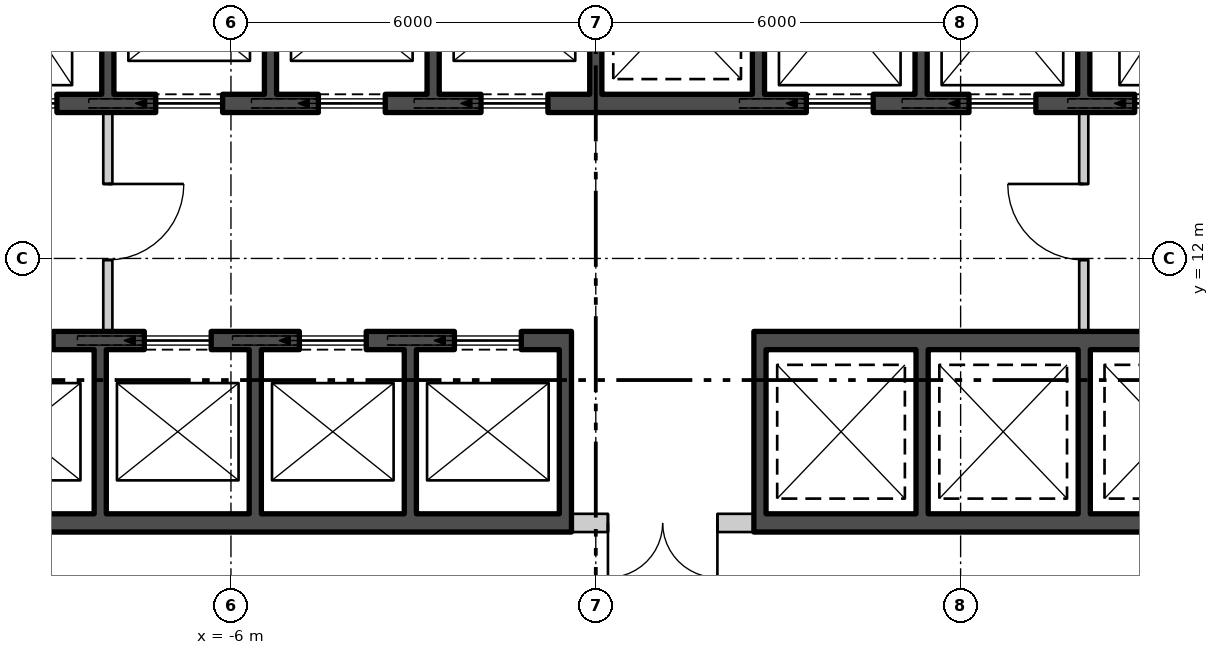
"""IFC4 building model, lengths in metres.
Left out: names, types, materials, properties, quantities, classifications, styles, units other than length and angle.
Written with IfcOpenShell. Run it as: python <this file> out.ifc"""

import sys

from ifc_helpers import new_model, si_unit, direction, frame, frame_2d, origin, place, context, subcontext, project, spatial, rectangle, extrude, element, fill, save


model = new_model("IFC4")
c1 = context("Model", 3, precision=1e-05, world=origin(), true_north=direction((0.0, 1.0)))
c2 = subcontext(c1, "Body", "Model", "MODEL_VIEW")
j1 = project(units=[si_unit("LENGTHUNIT", "METRE"), si_unit("PLANEANGLEUNIT", "RADIAN")], contexts=[c1])
p1 = place(None, origin())
s1 = spatial("IfcSite", under=j1, at=p1, CompositionType="ELEMENT")
p2 = place(p1, origin())
s2 = spatial("IfcBuilding", under=s1, at=p2, CompositionType="ELEMENT")
p3 = place(p2, frame((0.0, 0.0, 8.4)))
s3 = spatial("IfcBuildingStorey", under=s2, at=p3, CompositionType="ELEMENT", Elevation=8.4)
p4 = place(p3, frame((-10.7, 14.55, 0.0), z_axis=(0.0, 0.0, 1.0), x_axis=(1.0, 0.0, 0.0)))
e1 = element("IfcWall", 1, at=p4, inside=s3, PredefinedType="SHEAR", context=c2, shape_type="SweptSolid", body=[
    extrude(rectangle(XDim=21.4, YDim=0.3, at=frame_2d((10.7, 0.0))), origin(), (0.0, 0.0, 1.0), 4.88),
])
p5 = place(p4, frame((0.738, 0.0, 0.0)))
e2 = element("IfcOpeningElement", 2, at=p5, cuts=e1, PredefinedType="OPENING", context=c2, shape_type="SweptSolid", body=[
    extrude(rectangle(XDim=1.1, YDim=2.1, at=frame_2d((0.55, 1.05))), frame((0.0, 0.16, 0.0), z_axis=(0.0, -1.0, 0.0), x_axis=(1.0, 0.0, 0.0)), (0.0, 0.0, 1.0), 0.32),
])
p6 = place(p4, frame((3.462, 0.0, 0.0)))
e3 = element("IfcOpeningElement", 3, at=p6, cuts=e1, PredefinedType="OPENING", context=c2, shape_type="SweptSolid", body=[
    extrude(rectangle(XDim=1.1, YDim=2.1, at=frame_2d((0.55, 1.05))), frame((0.0, 0.16, 0.0), z_axis=(0.0, -1.0, 0.0), x_axis=(1.0, 0.0, 0.0)), (0.0, 0.0, 1.0), 0.32),
])
p7 = place(p4, frame((6.138, 0.0, 0.0)))
e4 = element("IfcOpeningElement", 4, at=p7, cuts=e1, PredefinedType="OPENING", context=c2, shape_type="SweptSolid", body=[
    extrude(rectangle(XDim=1.1, YDim=2.1, at=frame_2d((0.55, 1.05))), frame((0.0, 0.16, 0.0), z_axis=(0.0, -1.0, 0.0), x_axis=(1.0, 0.0, 0.0)), (0.0, 0.0, 1.0), 0.32),
])
p8 = place(p4, frame((8.812, 0.0, 0.0)))
e5 = element("IfcOpeningElement", 5, at=p8, cuts=e1, PredefinedType="OPENING", context=c2, shape_type="SweptSolid", body=[
    extrude(rectangle(XDim=1.1, YDim=2.1, at=frame_2d((0.55, 1.05))), frame((0.0, 0.16, 0.0), z_axis=(0.0, -1.0, 0.0), x_axis=(1.0, 0.0, 0.0)), (0.0, 0.0, 1.0), 0.32),
])
p9 = place(p4, frame((14.162, 0.0, 0.0)))
e6 = element("IfcOpeningElement", 6, at=p9, cuts=e1, PredefinedType="OPENING", context=c2, shape_type="SweptSolid", body=[
    extrude(rectangle(XDim=1.1, YDim=2.1, at=frame_2d((0.55, 1.05))), frame((0.0, 0.16, 0.0), z_axis=(0.0, -1.0, 0.0), x_axis=(1.0, 0.0, 0.0)), (0.0, 0.0, 1.0), 0.32),
])
p10 = place(p4, frame((16.837, 0.0, 0.0)))
e7 = element("IfcOpeningElement", 7, at=p10, cuts=e1, PredefinedType="OPENING", context=c2, shape_type="SweptSolid", body=[
    extrude(rectangle(XDim=1.1, YDim=2.1, at=frame_2d((0.55, 1.05))), frame((0.0, 0.16, 0.0), z_axis=(0.0, -1.0, 0.0), x_axis=(1.0, 0.0, 0.0)), (0.0, 0.0, 1.0), 0.32),
])
p11 = place(p4, frame((19.562, 0.0, 0.0)))
e8 = element("IfcOpeningElement", 8, at=p11, cuts=e1, PredefinedType="OPENING", context=c2, shape_type="SweptSolid", body=[
    extrude(rectangle(XDim=1.1, YDim=2.1, at=frame_2d((0.55, 1.05))), frame((0.0, 0.16, 0.0), z_axis=(0.0, -1.0, 0.0), x_axis=(1.0, 0.0, 0.0)), (0.0, 0.0, 1.0), 0.32),
])
p12 = place(p3, frame((-10.7, 10.65, 0.0), z_axis=(0.0, 0.0, 1.0), x_axis=(1.0, 0.0, 0.0)))
e9 = element("IfcWall", 9, at=p12, inside=s3, PredefinedType="SHEAR", context=c2, shape_type="SweptSolid", body=[
    extrude(rectangle(XDim=10.3, YDim=0.3, at=frame_2d((5.15, 0.0))), origin(), (0.0, 0.0, 1.0), 4.88),
])
p13 = place(p12, frame((0.675, 0.0, 0.0)))
e10 = element("IfcOpeningElement", 10, at=p13, cuts=e9, PredefinedType="OPENING", context=c2, shape_type="SweptSolid", body=[
    extrude(rectangle(XDim=1.1, YDim=2.1, at=frame_2d((0.55, 1.05))), frame((0.0, 0.16, 0.0), z_axis=(0.0, -1.0, 0.0), x_axis=(1.0, 0.0, 0.0)), (0.0, 0.0, 1.0), 0.32),
])
p14 = place(p12, frame((3.275, 0.0, 0.0)))
e11 = element("IfcOpeningElement", 11, at=p14, cuts=e9, PredefinedType="OPENING", context=c2, shape_type="SweptSolid", body=[
    extrude(rectangle(XDim=1.1, YDim=2.1, at=frame_2d((0.55, 1.05))), frame((0.0, 0.16, 0.0), z_axis=(0.0, -1.0, 0.0), x_axis=(1.0, 0.0, 0.0)), (0.0, 0.0, 1.0), 0.32),
])
p15 = place(p12, frame((5.825, 0.0, 0.0)))
e12 = element("IfcOpeningElement", 12, at=p15, cuts=e9, PredefinedType="OPENING", context=c2, shape_type="SweptSolid", body=[
    extrude(rectangle(XDim=1.1, YDim=2.1, at=frame_2d((0.55, 1.05))), frame((0.0, 0.16, 0.0), z_axis=(0.0, -1.0, 0.0), x_axis=(1.0, 0.0, 0.0)), (0.0, 0.0, 1.0), 0.32),
])
p16 = place(p12, frame((8.375, 0.0, 0.0)))
e13 = element("IfcOpeningElement", 13, at=p16, cuts=e9, PredefinedType="OPENING", context=c2, shape_type="SweptSolid", body=[
    extrude(rectangle(XDim=1.1, YDim=2.1, at=frame_2d((0.55, 1.05))), frame((0.0, 0.16, 0.0), z_axis=(0.0, -1.0, 0.0), x_axis=(1.0, 0.0, 0.0)), (0.0, 0.0, 1.0), 0.32),
])
p17 = place(p3, frame((-10.7, 7.65, 0.0), z_axis=(0.0, 0.0, 1.0), x_axis=(1.0, 0.0, 0.0)))
e14 = element("IfcWall", 14, at=p17, inside=s3, PredefinedType="SHEAR", context=c2, shape_type="SweptSolid", body=[
    extrude(rectangle(XDim=10.3, YDim=0.3, at=frame_2d((5.15, 0.0))), origin(), (0.0, 0.0, 1.0), 4.88),
])
for number, where, z_axis, x_axis in (
    (15, (2.6, 10.65, 0.0), (0.0, 0.0, 1.0), (1.0, 0.0, 0.0)),
    (16, (2.6, 7.65, 0.0), (0.0, 0.0, 1.0), (1.0, 0.0, 0.0)),
):
    element("IfcWall", number, at=place(p3, frame(where, z_axis=z_axis, x_axis=x_axis)), inside=s3, PredefinedType="SHEAR", context=c2, shape_type="SweptSolid", body=[
        extrude(rectangle(XDim=8.1, YDim=0.3, at=frame_2d((4.05, 0.0))), origin(), (0.0, 0.0, 1.0), 4.88),
    ])
for number, where, z_axis, x_axis in (
    (17, (-8.025, 14.7, 0.0), (0.0, 0.0, 1.0), (0.0, 1.0, 0.0)),
    (18, (-5.35, 14.7, 0.0), (0.0, 0.0, 1.0), (0.0, 1.0, 0.0)),
    (19, (-2.675, 14.7, 0.0), (0.0, 0.0, 1.0), (0.0, 1.0, 0.0)),
    (20, (0.0, 14.7, 0.0), (0.0, 0.0, 1.0), (0.0, 1.0, 0.0)),
    (21, (2.675, 14.7, 0.0), (0.0, 0.0, 1.0), (0.0, 1.0, 0.0)),
    (22, (5.35, 14.7, 0.0), (0.0, 0.0, 1.0), (0.0, 1.0, 0.0)),
    (23, (8.025, 14.7, 0.0), (0.0, 0.0, 1.0), (0.0, 1.0, 0.0)),
    (24, (-8.15, 7.8, 0.0), (0.0, 0.0, 1.0), (0.0, 1.0, 0.0)),
    (25, (-5.6, 7.8, 0.0), (0.0, 0.0, 1.0), (0.0, 1.0, 0.0)),
    (26, (-3.05, 7.8, 0.0), (0.0, 0.0, 1.0), (0.0, 1.0, 0.0)),
    (27, (-0.5, 7.8, 0.0), (0.0, 0.0, 1.0), (0.0, 1.0, 0.0)),
    (28, (2.7, 7.8, 0.0), (0.0, 0.0, 1.0), (0.0, 1.0, 0.0)),
    (29, (5.367, 7.8, 0.0), (0.0, 0.0, 1.0), (0.0, 1.0, 0.0)),
    (30, (8.033, 7.8, 0.0), (0.0, 0.0, 1.0), (0.0, 1.0, 0.0)),
):
    element("IfcWall", number, at=place(p3, frame(where, z_axis=z_axis, x_axis=x_axis)), inside=s3, PredefinedType="SHEAR", context=c2, shape_type="SweptSolid", body=[
        extrude(rectangle(XDim=2.7, YDim=0.2, at=frame_2d((1.35, 0.0))), origin(), (0.0, 0.0, 1.0), 4.88),
    ])
p18 = place(p3, frame((-8.025, 10.8, 0.0), z_axis=(0.0, 0.0, 1.0), x_axis=(0.0, 1.0, 0.0)))
e31 = element("IfcWall", 31, at=p18, inside=s3, PredefinedType="PARTITIONING", context=c2, shape_type="SweptSolid", body=[
    extrude(rectangle(XDim=3.6, YDim=0.15, at=frame_2d((1.8, 0.0))), origin(), (0.0, 0.0, 1.0), 4.88),
])
p19 = place(p18, frame((1.175, 0.0, 0.0)))
e32 = element("IfcOpeningElement", 32, at=p19, cuts=e31, PredefinedType="OPENING", context=c2, shape_type="SweptSolid", body=[
    extrude(rectangle(XDim=1.25, YDim=2.1, at=frame_2d((0.625, 1.05))), frame((0.0, 0.085, 0.0), z_axis=(0.0, -1.0, 0.0), x_axis=(1.0, 0.0, 0.0)), (0.0, 0.0, 1.0), 0.17),
])
p20 = place(p3, frame((8.025, 10.8, 0.0), z_axis=(0.0, 0.0, 1.0), x_axis=(0.0, 1.0, 0.0)))
e33 = element("IfcWall", 33, at=p20, inside=s3, PredefinedType="PARTITIONING", context=c2, shape_type="SweptSolid", body=[
    extrude(rectangle(XDim=3.6, YDim=0.15, at=frame_2d((1.8, 0.0))), origin(), (0.0, 0.0, 1.0), 4.88),
])
p21 = place(p20, frame((1.175, 0.0, 0.0)))
e34 = element("IfcOpeningElement", 34, at=p21, cuts=e33, PredefinedType="OPENING", context=c2, shape_type="SweptSolid", body=[
    extrude(rectangle(XDim=1.25, YDim=2.1, at=frame_2d((0.625, 1.05))), frame((0.0, 0.085, 0.0), z_axis=(0.0, -1.0, 0.0), x_axis=(1.0, 0.0, 0.0)), (0.0, 0.0, 1.0), 0.17),
])
p22 = place(p3, frame((-0.4, 7.65, 0.0), z_axis=(0.0, 0.0, 1.0), x_axis=(1.0, 0.0, 0.0)))
e35 = element("IfcWall", 35, at=p22, inside=s3, PredefinedType="PARTITIONING", context=c2, shape_type="SweptSolid", body=[
    extrude(rectangle(XDim=3.0, YDim=0.3, at=frame_2d((1.5, 0.0))), origin(), (0.0, 0.0, 1.0), 4.88),
])
p23 = place(p22, frame((0.6, 0.0, 0.0)))
e36 = element("IfcOpeningElement", 36, at=p23, cuts=e35, PredefinedType="OPENING", context=c2, shape_type="SweptSolid", body=[
    extrude(rectangle(XDim=1.8, YDim=2.4, at=frame_2d((0.9, 1.2))), frame((0.0, 0.16, 0.0), z_axis=(0.0, -1.0, 0.0), x_axis=(1.0, 0.0, 0.0)), (0.0, 0.0, 1.0), 0.32),
])
p24 = place(p5, origin())
e37 = element("IfcDoor", 37, at=p24, inside=s3, OperationType="SLIDING_TO_LEFT", PredefinedType="DOOR", context=c2, shape_type="SweptSolid", body=[
    extrude(rectangle(XDim=1.1, YDim=2.1, at=frame_2d((0.55, 1.05))), frame((0.0, 0.025, 0.0), z_axis=(0.0, -1.0, 0.0), x_axis=(1.0, 0.0, 0.0)), (0.0, 0.0, 1.0), 0.05),
])
fill(e2, e37)
p25 = place(p6, origin())
e38 = element("IfcDoor", 38, at=p25, inside=s3, OperationType="SLIDING_TO_LEFT", PredefinedType="DOOR", context=c2, shape_type="SweptSolid", body=[
    extrude(rectangle(XDim=1.1, YDim=2.1, at=frame_2d((0.55, 1.05))), frame((0.0, 0.025, 0.0), z_axis=(0.0, -1.0, 0.0), x_axis=(1.0, 0.0, 0.0)), (0.0, 0.0, 1.0), 0.05),
])
fill(e3, e38)
p26 = place(p7, origin())
e39 = element("IfcDoor", 39, at=p26, inside=s3, OperationType="SLIDING_TO_LEFT", PredefinedType="DOOR", context=c2, shape_type="SweptSolid", body=[
    extrude(rectangle(XDim=1.1, YDim=2.1, at=frame_2d((0.55, 1.05))), frame((0.0, 0.025, 0.0), z_axis=(0.0, -1.0, 0.0), x_axis=(1.0, 0.0, 0.0)), (0.0, 0.0, 1.0), 0.05),
])
fill(e4, e39)
p27 = place(p8, origin())
e40 = element("IfcDoor", 40, at=p27, inside=s3, OperationType="SLIDING_TO_LEFT", PredefinedType="DOOR", context=c2, shape_type="SweptSolid", body=[
    extrude(rectangle(XDim=1.1, YDim=2.1, at=frame_2d((0.55, 1.05))), frame((0.0, 0.025, 0.0), z_axis=(0.0, -1.0, 0.0), x_axis=(1.0, 0.0, 0.0)), (0.0, 0.0, 1.0), 0.05),
])
fill(e5, e40)
p28 = place(p9, origin())
e41 = element("IfcDoor", 41, at=p28, inside=s3, OperationType="SLIDING_TO_LEFT", PredefinedType="DOOR", context=c2, shape_type="SweptSolid", body=[
    extrude(rectangle(XDim=1.1, YDim=2.1, at=frame_2d((0.55, 1.05))), frame((0.0, 0.025, 0.0), z_axis=(0.0, -1.0, 0.0), x_axis=(1.0, 0.0, 0.0)), (0.0, 0.0, 1.0), 0.05),
])
fill(e6, e41)
p29 = place(p10, origin())
e42 = element("IfcDoor", 42, at=p29, inside=s3, OperationType="SLIDING_TO_LEFT", PredefinedType="DOOR", context=c2, shape_type="SweptSolid", body=[
    extrude(rectangle(XDim=1.1, YDim=2.1, at=frame_2d((0.55, 1.05))), frame((0.0, 0.025, 0.0), z_axis=(0.0, -1.0, 0.0), x_axis=(1.0, 0.0, 0.0)), (0.0, 0.0, 1.0), 0.05),
])
fill(e7, e42)
p30 = place(p11, origin())
e43 = element("IfcDoor", 43, at=p30, inside=s3, OperationType="SLIDING_TO_LEFT", PredefinedType="DOOR", context=c2, shape_type="SweptSolid", body=[
    extrude(rectangle(XDim=1.1, YDim=2.1, at=frame_2d((0.55, 1.05))), frame((0.0, 0.025, 0.0), z_axis=(0.0, -1.0, 0.0), x_axis=(1.0, 0.0, 0.0)), (0.0, 0.0, 1.0), 0.05),
])
fill(e8, e43)
p31 = place(p13, origin())
e44 = element("IfcDoor", 44, at=p31, inside=s3, OperationType="SLIDING_TO_LEFT", PredefinedType="DOOR", context=c2, shape_type="SweptSolid", body=[
    extrude(rectangle(XDim=1.1, YDim=2.1, at=frame_2d((0.55, 1.05))), frame((0.0, 0.025, 0.0), z_axis=(0.0, -1.0, 0.0), x_axis=(1.0, 0.0, 0.0)), (0.0, 0.0, 1.0), 0.05),
])
fill(e10, e44)
p32 = place(p14, origin())
e45 = element("IfcDoor", 45, at=p32, inside=s3, OperationType="SLIDING_TO_LEFT", PredefinedType="DOOR", context=c2, shape_type="SweptSolid", body=[
    extrude(rectangle(XDim=1.1, YDim=2.1, at=frame_2d((0.55, 1.05))), frame((0.0, 0.025, 0.0), z_axis=(0.0, -1.0, 0.0), x_axis=(1.0, 0.0, 0.0)), (0.0, 0.0, 1.0), 0.05),
])
fill(e11, e45)
p33 = place(p15, origin())
e46 = element("IfcDoor", 46, at=p33, inside=s3, OperationType="SLIDING_TO_LEFT", PredefinedType="DOOR", context=c2, shape_type="SweptSolid", body=[
    extrude(rectangle(XDim=1.1, YDim=2.1, at=frame_2d((0.55, 1.05))), frame((0.0, 0.025, 0.0), z_axis=(0.0, -1.0, 0.0), x_axis=(1.0, 0.0, 0.0)), (0.0, 0.0, 1.0), 0.05),
])
fill(e12, e46)
p34 = place(p16, origin())
e47 = element("IfcDoor", 47, at=p34, inside=s3, OperationType="SLIDING_TO_LEFT", PredefinedType="DOOR", context=c2, shape_type="SweptSolid", body=[
    extrude(rectangle(XDim=1.1, YDim=2.1, at=frame_2d((0.55, 1.05))), frame((0.0, 0.025, 0.0), z_axis=(0.0, -1.0, 0.0), x_axis=(1.0, 0.0, 0.0)), (0.0, 0.0, 1.0), 0.05),
])
fill(e13, e47)
p35 = place(p19, origin())
e48 = element("IfcDoor", 48, at=p35, inside=s3, OperationType="SINGLE_SWING_RIGHT", PredefinedType="DOOR", context=c2, shape_type="SweptSolid", body=[
    extrude(rectangle(XDim=1.25, YDim=2.1, at=frame_2d((0.625, 1.05))), frame((0.0, 0.025, 0.0), z_axis=(0.0, -1.0, 0.0), x_axis=(1.0, 0.0, 0.0)), (0.0, 0.0, 1.0), 0.05),
])
fill(e32, e48)
p36 = place(p21, origin())
e49 = element("IfcDoor", 49, at=p36, inside=s3, OperationType="SINGLE_SWING_LEFT", PredefinedType="DOOR", context=c2, shape_type="SweptSolid", body=[
    extrude(rectangle(XDim=1.25, YDim=2.1, at=frame_2d((0.625, 1.05))), frame((0.0, 0.025, 0.0), z_axis=(0.0, -1.0, 0.0), x_axis=(1.0, 0.0, 0.0)), (0.0, 0.0, 1.0), 0.05),
])
fill(e34, e49)
p37 = place(p23, origin())
e50 = element("IfcDoor", 50, at=p37, inside=s3, OperationType="DOUBLE_DOOR_SINGLE_SWING", PredefinedType="DOOR", context=c2, shape_type="SweptSolid", body=[
    extrude(rectangle(XDim=1.8, YDim=2.4, at=frame_2d((0.9, 1.2))), frame((0.0, 0.025, 0.0), z_axis=(0.0, -1.0, 0.0), x_axis=(1.0, 0.0, 0.0)), (0.0, 0.0, 1.0), 0.05),
])
fill(e36, e50)
save(model, sys.argv[1])
